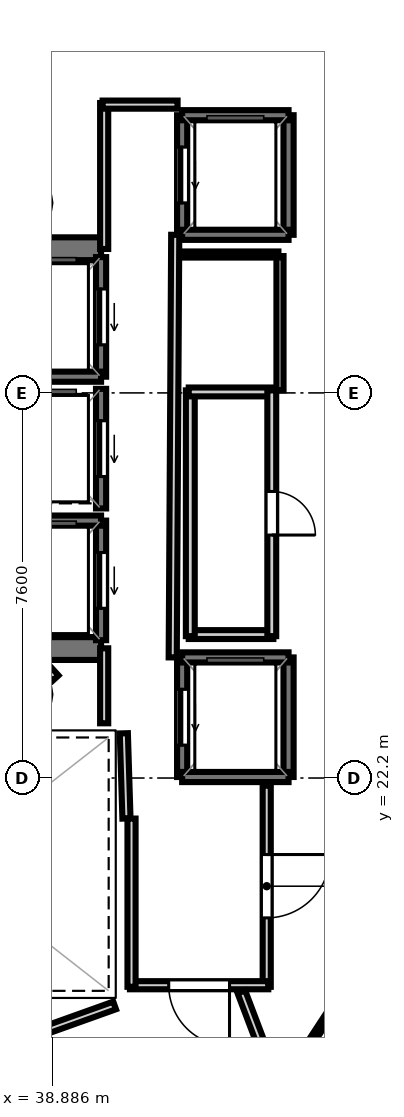
"""IFC4 building model, lengths in metres.
Left out: names, types, materials, properties, quantities, classifications, styles, units other than length and angle.
Written with IfcOpenShell. Run it as: python <this file> out.ifc"""

import sys

from ifc_helpers import new_model, si_unit, direction, frame, frame_2d, origin, place, context, subcontext, project, spatial, rectangle, extrude, element, fill, save


model = new_model("IFC4")
c1 = context("Model", 3, precision=1e-05, world=origin(), true_north=direction((0.0, 1.0)))
c2 = subcontext(c1, "Body", "Model", "MODEL_VIEW")
j1 = project(units=[si_unit("LENGTHUNIT", "METRE"), si_unit("PLANEANGLEUNIT", "RADIAN")], contexts=[c1])
p1 = place(None, origin())
s1 = spatial("IfcSite", under=j1, at=p1, CompositionType="ELEMENT")
p2 = place(p1, origin())
s2 = spatial("IfcBuilding", under=s1, at=p2, CompositionType="ELEMENT")
p3 = place(p2, frame((0.0, 0.0, 295.4)))
s3 = spatial("IfcBuildingStorey", under=s2, at=p3, CompositionType="ELEMENT", Elevation=295.4)
p4 = place(p3, frame((29.33, 32.645, 0.0), z_axis=(0.0, 0.0, 1.0), x_axis=(1.0, 0.0, 0.0)))
e1 = element("IfcWall", 1, at=p4, inside=s3, PredefinedType="SHEAR", context=c2, shape_type="SweptSolid", body=[
    extrude(rectangle(XDim=10.52, YDim=0.45, at=frame_2d((5.26, 0.0))), origin(), (0.0, 0.0, 1.0), 3.52),
])
p5 = place(p4, frame((0.895, 0.0, 0.0)))
e2 = element("IfcOpeningElement", 2, at=p5, cuts=e1, PredefinedType="OPENING", context=c2, shape_type="SweptSolid", body=[
    extrude(rectangle(XDim=1.25, YDim=2.15, at=frame_2d((0.625, 1.075))), frame((0.0, 0.235, 0.0), z_axis=(0.0, -1.0, 0.0), x_axis=(1.0, 0.0, 0.0)), (0.0, 0.0, 1.0), 0.47),
])
p6 = place(p3, frame((29.33, 24.755, 0.0), z_axis=(0.0, 0.0, 1.0), x_axis=(1.0, 0.0, 0.0)))
e3 = element("IfcWall", 3, at=p6, inside=s3, PredefinedType="SHEAR", context=c2, shape_type="SweptSolid", body=[
    extrude(rectangle(XDim=10.52, YDim=0.45, at=frame_2d((5.26, 0.0))), origin(), (0.0, 0.0, 1.0), 3.52),
])
p7 = place(p6, frame((0.695, 0.0, 0.0)))
e4 = element("IfcOpeningElement", 4, at=p7, cuts=e3, PredefinedType="OPENING", context=c2, shape_type="SweptSolid", body=[
    extrude(rectangle(XDim=1.25, YDim=2.15, at=frame_2d((0.625, 1.075))), frame((0.0, 0.235, 0.0), z_axis=(0.0, -1.0, 0.0), x_axis=(1.0, 0.0, 0.0)), (0.0, 0.0, 1.0), 0.47),
])
p8 = place(p3, frame((39.85, 30.12, 0.0), z_axis=(0.0, 0.0, 1.0), x_axis=(0.0, 1.0, 0.0)))
e5 = element("IfcWall", 5, at=p8, inside=s3, PredefinedType="SOLIDWALL", context=c2, shape_type="SweptSolid", body=[
    extrude(rectangle(XDim=2.36, YDim=0.2, at=frame_2d((1.18, 0.0))), origin(), (0.0, 0.0, 1.0), 3.52),
])
p9 = place(p8, frame((0.63, 0.0, 0.0)))
e6 = element("IfcOpeningElement", 6, at=p9, cuts=e5, PredefinedType="OPENING", context=c2, shape_type="SweptSolid", body=[
    extrude(rectangle(XDim=1.1, YDim=2.15, at=frame_2d((0.55, 1.075))), frame((0.0, 0.11, 0.0), z_axis=(0.0, -1.0, 0.0), x_axis=(1.0, 0.0, 0.0)), (0.0, 0.0, 1.0), 0.22),
])
p10 = place(p3, frame((37.75, 30.12, 0.0), z_axis=(0.0, 0.0, 1.0), x_axis=(1.0, 0.0, 0.0)))
e7 = element("IfcWall", 7, at=p10, inside=s3, PredefinedType="SOLIDWALL", context=c2, shape_type="SweptSolid", body=[
    extrude(rectangle(XDim=2.1, YDim=0.2, at=frame_2d((1.05, 0.0))), origin(), (0.0, 0.0, 1.0), 3.52),
])
p11 = place(p3, frame((39.85, 24.92, 0.0), z_axis=(0.0, 0.0, 1.0), x_axis=(0.0, 1.0, 0.0)))
e8 = element("IfcWall", 8, at=p11, inside=s3, PredefinedType="SOLIDWALL", context=c2, shape_type="SweptSolid", body=[
    extrude(rectangle(XDim=2.36, YDim=0.2, at=frame_2d((1.18, 0.0))), origin(), (0.0, 0.0, 1.0), 3.52),
])
p12 = place(p11, frame((0.63, 0.0, 0.0)))
e9 = element("IfcOpeningElement", 9, at=p12, cuts=e8, PredefinedType="OPENING", context=c2, shape_type="SweptSolid", body=[
    extrude(rectangle(XDim=1.1, YDim=2.15, at=frame_2d((0.55, 1.075))), frame((0.0, 0.11, 0.0), z_axis=(0.0, -1.0, 0.0), x_axis=(1.0, 0.0, 0.0)), (0.0, 0.0, 1.0), 0.22),
])
p13 = place(p3, frame((37.75, 27.28, 0.0), z_axis=(0.0, 0.0, 1.0), x_axis=(1.0, 0.0, 0.0)))
e10 = element("IfcWall", 10, at=p13, inside=s3, PredefinedType="SOLIDWALL", context=c2, shape_type="SweptSolid", body=[
    extrude(rectangle(XDim=2.1, YDim=0.2, at=frame_2d((1.05, 0.0))), origin(), (0.0, 0.0, 1.0), 3.52),
])
p14 = place(p3, frame((39.85, 27.52, 0.0), z_axis=(0.0, 0.0, 1.0), x_axis=(0.0, 1.0, 0.0)))
e11 = element("IfcWall", 11, at=p14, inside=s3, PredefinedType="SOLIDWALL", context=c2, shape_type="SweptSolid", body=[
    extrude(rectangle(XDim=2.36, YDim=0.2, at=frame_2d((1.18, 0.0))), origin(), (0.0, 0.0, 1.0), 3.52),
])
p15 = place(p14, frame((0.63, 0.0, 0.0)))
e12 = element("IfcOpeningElement", 12, at=p15, cuts=e11, PredefinedType="OPENING", context=c2, shape_type="SweptSolid", body=[
    extrude(rectangle(XDim=1.1, YDim=2.15, at=frame_2d((0.55, 1.075))), frame((0.0, 0.11, 0.0), z_axis=(0.0, -1.0, 0.0), x_axis=(1.0, 0.0, 0.0)), (0.0, 0.0, 1.0), 0.22),
])
p16 = place(p3, frame((43.55, 22.22, 0.0), z_axis=(0.0, 0.0, 1.0), x_axis=(0.0, 1.0, 0.0)))
e13 = element("IfcWall", 13, at=p16, inside=s3, PredefinedType="SOLIDWALL", context=c2, shape_type="SweptSolid", body=[
    extrude(rectangle(XDim=2.36, YDim=0.2, at=frame_2d((1.18, 0.0))), origin(), (0.0, 0.0, 1.0), 3.52),
])
p17 = place(p3, frame((41.45, 22.22, 0.0), z_axis=(0.0, 0.0, 1.0), x_axis=(0.0, 1.0, 0.0)))
e14 = element("IfcWall", 14, at=p17, inside=s3, PredefinedType="SOLIDWALL", context=c2, shape_type="SweptSolid", body=[
    extrude(rectangle(XDim=2.36, YDim=0.2, at=frame_2d((1.18, 0.0))), origin(), (0.0, 0.0, 1.0), 3.52),
])
p18 = place(p17, frame((0.63, 0.0, 0.0)))
e15 = element("IfcOpeningElement", 15, at=p18, cuts=e14, PredefinedType="OPENING", context=c2, shape_type="SweptSolid", body=[
    extrude(rectangle(XDim=1.1, YDim=2.15, at=frame_2d((0.55, 1.075))), frame((0.0, 0.11, 0.0), z_axis=(0.0, -1.0, 0.0), x_axis=(1.0, 0.0, 0.0)), (0.0, 0.0, 1.0), 0.22),
])
for number, where, z_axis, x_axis in (
    (16, (41.45, 24.58, 0.0), (0.0, 0.0, 1.0), (1.0, 0.0, 0.0)),
    (17, (41.45, 22.22, 0.0), (0.0, 0.0, 1.0), (1.0, 0.0, 0.0)),
):
    element("IfcWall", number, at=place(p3, frame(where, z_axis=z_axis, x_axis=x_axis)), inside=s3, PredefinedType="SOLIDWALL", context=c2, shape_type="SweptSolid", body=[
        extrude(rectangle(XDim=2.1, YDim=0.2, at=frame_2d((1.05, 0.0))), origin(), (0.0, 0.0, 1.0), 3.52),
    ])
p19 = place(p3, frame((43.55, 32.92, 0.0), z_axis=(0.0, 0.0, 1.0), x_axis=(0.0, 1.0, 0.0)))
e18 = element("IfcWall", 18, at=p19, inside=s3, PredefinedType="SOLIDWALL", context=c2, shape_type="SweptSolid", body=[
    extrude(rectangle(XDim=2.36, YDim=0.2, at=frame_2d((1.18, 0.0))), origin(), (0.0, 0.0, 1.0), 3.52),
])
p20 = place(p3, frame((41.45, 32.92, 0.0), z_axis=(0.0, 0.0, 1.0), x_axis=(0.0, 1.0, 0.0)))
e19 = element("IfcWall", 19, at=p20, inside=s3, PredefinedType="SOLIDWALL", context=c2, shape_type="SweptSolid", body=[
    extrude(rectangle(XDim=2.36, YDim=0.2, at=frame_2d((1.18, 0.0))), origin(), (0.0, 0.0, 1.0), 3.52),
])
p21 = place(p20, frame((0.63, 0.0, 0.0)))
e20 = element("IfcOpeningElement", 20, at=p21, cuts=e19, PredefinedType="OPENING", context=c2, shape_type="SweptSolid", body=[
    extrude(rectangle(XDim=1.1, YDim=2.15, at=frame_2d((0.55, 1.075))), frame((0.0, 0.11, 0.0), z_axis=(0.0, -1.0, 0.0), x_axis=(1.0, 0.0, 0.0)), (0.0, 0.0, 1.0), 0.22),
])
for number, where, z_axis, x_axis in (
    (21, (41.45, 35.28, 0.0), (0.0, 0.0, 1.0), (1.0, 0.0, 0.0)),
    (22, (41.45, 32.92, 0.0), (0.0, 0.0, 1.0), (1.0, 0.0, 0.0)),
):
    element("IfcWall", number, at=place(p3, frame(where, z_axis=z_axis, x_axis=x_axis)), inside=s3, PredefinedType="SOLIDWALL", context=c2, shape_type="SweptSolid", body=[
        extrude(rectangle(XDim=2.1, YDim=0.2, at=frame_2d((1.05, 0.0))), origin(), (0.0, 0.0, 1.0), 3.52),
    ])
p22 = place(p3, frame((40.351, 21.401, 0.0), z_axis=(0.0, 0.0, 1.0), x_axis=(-0.031058045979, 0.999517582527, 0.0)))
e23 = element("IfcWall", 23, at=p22, inside=s3, PredefinedType="PARTITIONING", context=c2, shape_type="SweptSolid", body=[
    extrude(rectangle(XDim=1.682, YDim=0.16, at=frame_2d((0.841, 0.0))), origin(), (0.0, 0.0, 1.0), 2.84),
])
p23 = place(p3, frame((39.911, 23.28, 0.0), z_axis=(0.0, 0.0, 1.0), x_axis=(0.0, 1.0, 0.0)))
e24 = element("IfcWall", 24, at=p23, inside=s3, PredefinedType="PARTITIONING", context=c2, shape_type="SweptSolid", body=[
    extrude(rectangle(XDim=1.48, YDim=0.16, at=frame_2d((0.74, 0.0))), origin(), (0.0, 0.0, 1.0), 2.84),
])
p24 = place(p3, frame((39.911, 32.64, 0.0), z_axis=(0.0, 0.0, 1.0), x_axis=(0.0, 1.0, 0.0)))
e25 = element("IfcWall", 25, at=p24, inside=s3, PredefinedType="PARTITIONING", context=c2, shape_type="SweptSolid", body=[
    extrude(rectangle(XDim=2.88, YDim=0.16, at=frame_2d((1.44, 0.0))), origin(), (0.0, 0.0, 1.0), 2.84),
])
p25 = place(p3, frame((39.88, 35.489, 0.0), z_axis=(0.0, 0.0, 1.0), x_axis=(1.0, 0.0, 0.0)))
e26 = element("IfcWall", 26, at=p25, inside=s3, PredefinedType="PARTITIONING", context=c2, shape_type="SweptSolid", body=[
    extrude(rectangle(XDim=1.48, YDim=0.16, at=frame_2d((0.74, 0.0))), origin(), (0.0, 0.0, 1.0), 2.84),
])
p26 = place(p3, frame((41.313, 32.92, 0.0), z_axis=(0.0, 0.0, 1.0), x_axis=(-0.005942518022, -0.999982343084, 0.0)))
e27 = element("IfcWall", 27, at=p26, inside=s3, PredefinedType="PARTITIONING", context=c2, shape_type="SweptSolid", body=[
    extrude(rectangle(XDim=8.34, YDim=0.16, at=frame_2d((4.17, 0.0))), origin(), (0.0, 0.0, 1.0), 2.84),
])
p27 = place(p3, frame((43.119, 22.05, 0.0), z_axis=(0.0, 0.0, 1.0), x_axis=(0.0, -1.0, 0.0)))
e28 = element("IfcWall", 28, at=p27, inside=s3, PredefinedType="PARTITIONING", context=c2, shape_type="SweptSolid", body=[
    extrude(rectangle(XDim=3.97, YDim=0.16, at=frame_2d((1.985, 0.0))), origin(), (0.0, 0.0, 1.0), 2.84),
])
p28 = place(p27, frame((1.36, 0.0, 0.0)))
e29 = element("IfcOpeningElement", 29, at=p28, cuts=e28, PredefinedType="OPENING", context=c2, shape_type="SweptSolid", body=[
    extrude(rectangle(XDim=1.25, YDim=2.2, at=frame_2d((0.625, 1.1))), frame((0.0, 0.09, 0.0), z_axis=(0.0, -1.0, 0.0), x_axis=(1.0, 0.0, 0.0)), (0.0, 0.0, 1.0), 0.18),
])
p29 = place(p3, frame((43.15, 18.111, 0.0), z_axis=(0.0, 0.0, 1.0), x_axis=(-1.0, 0.0, 0.0)))
e30 = element("IfcWall", 30, at=p29, inside=s3, PredefinedType="PARTITIONING", context=c2, shape_type="SweptSolid", body=[
    extrude(rectangle(XDim=2.73, YDim=0.16, at=frame_2d((1.365, 0.0))), origin(), (0.0, 0.0, 1.0), 2.84),
])
p30 = place(p29, frame((0.765, 0.0, 0.0)))
e31 = element("IfcOpeningElement", 31, at=p30, cuts=e30, PredefinedType="OPENING", context=c2, shape_type="SweptSolid", body=[
    extrude(rectangle(XDim=1.2, YDim=2.15, at=frame_2d((0.6, 1.075))), frame((0.0, 0.09, 0.0), z_axis=(0.0, -1.0, 0.0), x_axis=(1.0, 0.0, 0.0)), (0.0, 0.0, 1.0), 0.18),
])
p31 = place(p3, frame((40.451, 18.08, 0.0), z_axis=(0.0, 0.0, 1.0), x_axis=(0.0, 1.0, 0.0)))
e32 = element("IfcWall", 32, at=p31, inside=s3, PredefinedType="PARTITIONING", context=c2, shape_type="SweptSolid", body=[
    extrude(rectangle(XDim=3.32, YDim=0.16, at=frame_2d((1.66, 0.0))), origin(), (0.0, 0.0, 1.0), 2.84),
])
p32 = place(p3, frame((43.25, 25.031, 0.0), z_axis=(0.0, 0.0, 1.0), x_axis=(-1.0, 0.0, 0.0)))
e33 = element("IfcWall", 33, at=p32, inside=s3, PredefinedType="PLUMBINGWALL", context=c2, shape_type="SweptSolid", body=[
    extrude(rectangle(XDim=1.67, YDim=0.175, at=frame_2d((0.835, 0.0))), origin(), (0.0, 0.0, 1.0), 2.84),
])
p33 = place(p3, frame((41.611, 25.0, 0.0), z_axis=(0.0, 0.0, 1.0), x_axis=(0.0, 1.0, 0.0)))
e34 = element("IfcWall", 34, at=p33, inside=s3, PredefinedType="PLUMBINGWALL", context=c2, shape_type="SweptSolid", body=[
    extrude(rectangle(XDim=4.85, YDim=0.175, at=frame_2d((2.425, 0.0))), origin(), (0.0, 0.0, 1.0), 2.84),
])
p34 = place(p3, frame((41.58, 29.819, 0.0), z_axis=(0.0, 0.0, 1.0), x_axis=(1.0, 0.0, 0.0)))
e35 = element("IfcWall", 35, at=p34, inside=s3, PredefinedType="PLUMBINGWALL", context=c2, shape_type="SweptSolid", body=[
    extrude(rectangle(XDim=1.67, YDim=0.175, at=frame_2d((0.835, 0.0))), origin(), (0.0, 0.0, 1.0), 2.84),
])
p35 = place(p3, frame((43.219, 29.85, 0.0), z_axis=(0.0, 0.0, 1.0), x_axis=(0.0, -1.0, 0.0)))
e36 = element("IfcWall", 36, at=p35, inside=s3, PredefinedType="PLUMBINGWALL", context=c2, shape_type="SweptSolid", body=[
    extrude(rectangle(XDim=4.85, YDim=0.175, at=frame_2d((2.425, 0.0))), origin(), (0.0, 0.0, 1.0), 2.84),
])
p36 = place(p35, frame((1.995, 0.0, 0.0)))
e37 = element("IfcOpeningElement", 37, at=p36, cuts=e36, PredefinedType="OPENING", context=c2, shape_type="SweptSolid", body=[
    extrude(rectangle(XDim=0.86, YDim=2.05, at=frame_2d((0.43, 1.025))), frame((0.0, 0.097, 0.0), z_axis=(0.0, -1.0, 0.0), x_axis=(1.0, 0.0, 0.0)), (0.0, 0.0, 1.0), 0.195),
])
p37 = place(p3, frame((38.951, 24.171, 0.0), z_axis=(0.0, 0.0, 1.0), x_axis=(-0.674186852077, 0.738560822469, 0.0)))
e38 = element("IfcWall", 38, at=p37, inside=s3, PredefinedType="PARTITIONING", context=c2, shape_type="SweptSolid", body=[
    extrude(rectangle(XDim=0.281, YDim=0.16, at=frame_2d((0.14, 0.0))), origin(), (0.0, 0.0, 1.0), 2.84),
])
p38 = place(p3, frame((36.81, 16.529, 0.0), z_axis=(0.0, 0.0, 1.0), x_axis=(0.941548344365, 0.33687789364, 0.0)))
e39 = element("IfcWall", 39, at=p38, inside=s3, PredefinedType="PARTITIONING", context=c2, shape_type="SweptSolid", body=[
    extrude(rectangle(XDim=3.513, YDim=0.16, at=frame_2d((1.756, 0.0))), origin(), (0.0, 0.0, 1.0), 2.84),
])
p39 = place(p3, frame((42.619, 17.98, 0.0), z_axis=(0.0, 0.0, 1.0), x_axis=(0.354310790583, -0.935127725862, 0.0)))
e40 = element("IfcWall", 40, at=p39, inside=s3, PredefinedType="PARTITIONING", context=c2, shape_type="SweptSolid", body=[
    extrude(rectangle(XDim=2.743, YDim=0.16, at=frame_2d((1.372, 0.0))), origin(), (0.0, 0.0, 1.0), 2.84),
])
p40 = place(p3, frame((43.381, 29.85, 0.0), z_axis=(0.0, 0.0, 1.0), x_axis=(0.0, 1.0, 0.0)))
e41 = element("IfcWall", 41, at=p40, inside=s3, PredefinedType="PARTITIONING", context=c2, shape_type="SweptSolid", body=[
    extrude(rectangle(XDim=2.65, YDim=0.14, at=frame_2d((1.325, 0.0))), origin(), (0.0, 0.0, 1.0), 2.84),
])
p41 = place(p3, frame((43.35, 32.531, 0.0), z_axis=(0.0, 0.0, 1.0), x_axis=(-1.0, 0.0, 0.0)))
e42 = element("IfcWall", 42, at=p41, inside=s3, PredefinedType="PARTITIONING", context=c2, shape_type="SweptSolid", body=[
    extrude(rectangle(XDim=1.91, YDim=0.12, at=frame_2d((0.955, 0.0))), origin(), (0.0, 0.0, 1.0), 2.84),
])
p42 = place(p3, frame((56.387, 35.955, 0.0), z_axis=(0.0, 0.0, 1.0), x_axis=(-0.547085490545, -0.837076738439, 0.0)))
e43 = element("IfcWall", 43, at=p42, inside=s3, PredefinedType="PARTITIONING", context=c2, shape_type="SweptSolid", body=[
    extrude(rectangle(XDim=34.443, YDim=0.12, at=frame_2d((17.221, 0.0))), origin(), (0.0, 0.0, 1.0), 2.095),
])
p43 = place(p9, origin())
e44 = element("IfcDoor", 44, at=p43, inside=s3, OperationType="SLIDING_TO_LEFT", PredefinedType="DOOR", context=c2, shape_type="SweptSolid", body=[
    extrude(rectangle(XDim=1.1, YDim=2.15, at=frame_2d((0.55, 1.075))), frame((0.0, 0.025, 0.0), z_axis=(0.0, -1.0, 0.0), x_axis=(1.0, 0.0, 0.0)), (0.0, 0.0, 1.0), 0.05),
])
fill(e6, e44)
p44 = place(p12, origin())
e45 = element("IfcDoor", 45, at=p44, inside=s3, OperationType="SLIDING_TO_LEFT", PredefinedType="DOOR", context=c2, shape_type="SweptSolid", body=[
    extrude(rectangle(XDim=1.1, YDim=2.15, at=frame_2d((0.55, 1.075))), frame((0.0, 0.025, 0.0), z_axis=(0.0, -1.0, 0.0), x_axis=(1.0, 0.0, 0.0)), (0.0, 0.0, 1.0), 0.05),
])
fill(e9, e45)
p45 = place(p15, origin())
e46 = element("IfcDoor", 46, at=p45, inside=s3, OperationType="SLIDING_TO_LEFT", PredefinedType="DOOR", context=c2, shape_type="SweptSolid", body=[
    extrude(rectangle(XDim=1.1, YDim=2.15, at=frame_2d((0.55, 1.075))), frame((0.0, 0.025, 0.0), z_axis=(0.0, -1.0, 0.0), x_axis=(1.0, 0.0, 0.0)), (0.0, 0.0, 1.0), 0.05),
])
fill(e12, e46)
p46 = place(p18, origin())
e47 = element("IfcDoor", 47, at=p46, inside=s3, OperationType="SLIDING_TO_LEFT", PredefinedType="DOOR", context=c2, shape_type="SweptSolid", body=[
    extrude(rectangle(XDim=1.1, YDim=2.15, at=frame_2d((0.55, 1.075))), frame((0.0, 0.025, 0.0), z_axis=(0.0, -1.0, 0.0), x_axis=(1.0, 0.0, 0.0)), (0.0, 0.0, 1.0), 0.05),
])
fill(e15, e47)
p47 = place(p21, origin())
e48 = element("IfcDoor", 48, at=p47, inside=s3, OperationType="SLIDING_TO_LEFT", PredefinedType="DOOR", context=c2, shape_type="SweptSolid", body=[
    extrude(rectangle(XDim=1.1, YDim=2.15, at=frame_2d((0.55, 1.075))), frame((0.0, 0.025, 0.0), z_axis=(0.0, -1.0, 0.0), x_axis=(1.0, 0.0, 0.0)), (0.0, 0.0, 1.0), 0.05),
])
fill(e20, e48)
p48 = place(p30, origin())
e49 = element("IfcDoor", 49, at=p48, inside=s3, OperationType="SINGLE_SWING_LEFT", PredefinedType="DOOR", context=c2, shape_type="SweptSolid", body=[
    extrude(rectangle(XDim=1.2, YDim=2.15, at=frame_2d((0.6, 1.075))), frame((0.0, 0.025, 0.0), z_axis=(0.0, -1.0, 0.0), x_axis=(1.0, 0.0, 0.0)), (0.0, 0.0, 1.0), 0.05),
])
fill(e31, e49)
p49 = place(p28, origin())
e50 = element("IfcDoor", 50, at=p49, inside=s3, OperationType="SINGLE_SWING_LEFT", PredefinedType="DOOR", context=c2, shape_type="SweptSolid", body=[
    extrude(rectangle(XDim=1.25, YDim=2.2, at=frame_2d((0.625, 1.1))), frame((0.0, 0.025, 0.0), z_axis=(0.0, -1.0, 0.0), x_axis=(1.0, 0.0, 0.0)), (0.0, 0.0, 1.0), 0.05),
])
fill(e29, e50)
p50 = place(p36, origin())
e51 = element("IfcDoor", 51, at=p50, inside=s3, OperationType="SINGLE_SWING_RIGHT", PredefinedType="DOOR", context=c2, shape_type="SweptSolid", body=[
    extrude(rectangle(XDim=0.86, YDim=2.05, at=frame_2d((0.43, 1.025))), frame((0.0, 0.025, 0.0), z_axis=(0.0, -1.0, 0.0), x_axis=(1.0, 0.0, 0.0)), (0.0, 0.0, 1.0), 0.05),
])
fill(e37, e51)
save(model, sys.argv[1])
